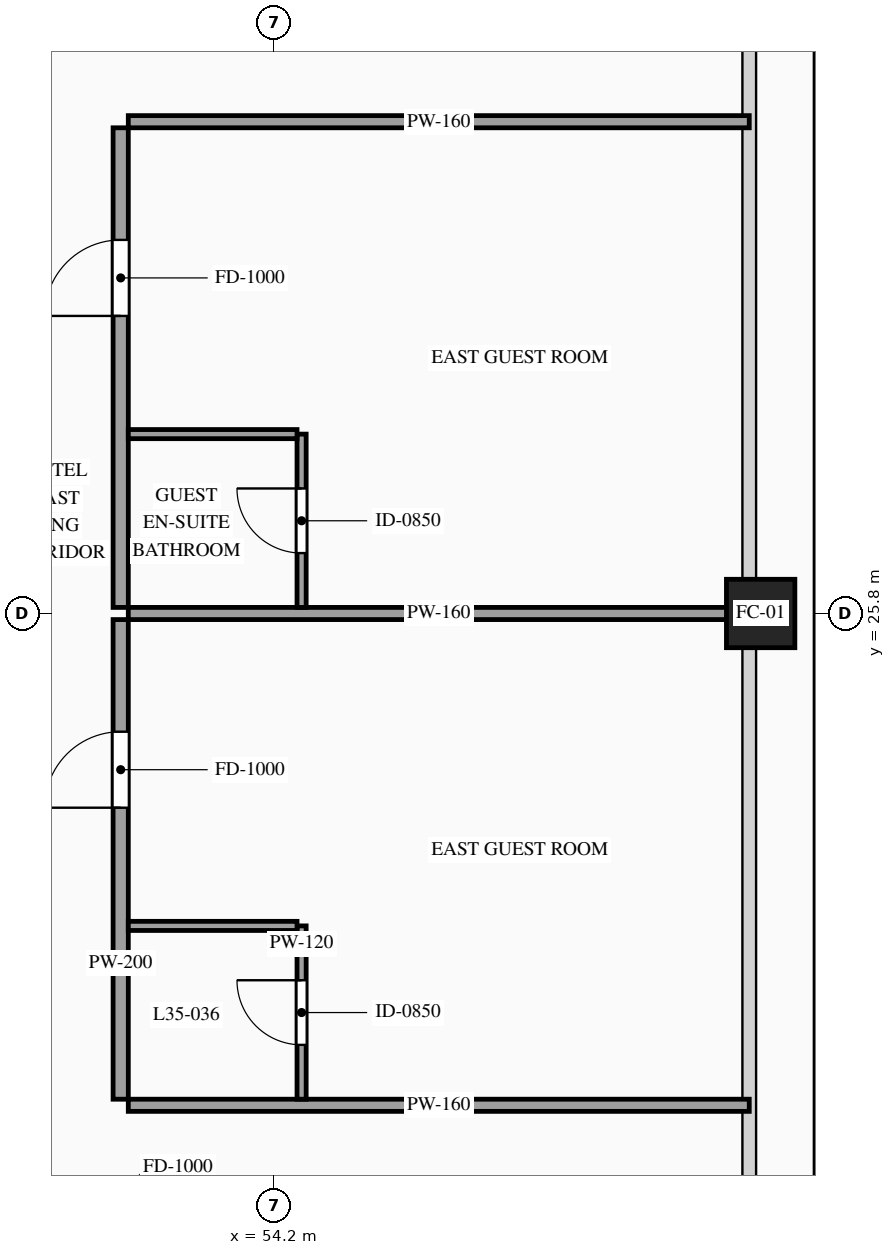
"""IFC4 building model, lengths in metres.
Left out: names, types, materials, properties, quantities, classifications, styles, units other than length and angle.
Written with IfcOpenShell. Run it as: python <this file> out.ifc"""

import sys

from ifc_helpers import new_model, si_unit, direction, frame, frame_2d, origin, origin_2d, place, context, subcontext, project, spatial, rectangle, hollow_rectangle, extrude, source, transform, mapped, element, fill, save


model = new_model("IFC4")
c1 = context("Model", 3, precision=1e-05, world=origin(), true_north=direction((0.0, 1.0)))
c2 = subcontext(c1, "Body", "Model", "MODEL_VIEW")
j1 = project(units=[si_unit("LENGTHUNIT", "METRE"), si_unit("PLANEANGLEUNIT", "RADIAN")], contexts=[c1])
p1 = place(None, origin())
s1 = spatial("IfcSite", under=j1, at=p1, CompositionType="ELEMENT")
p2 = place(p1, origin())
s2 = spatial("IfcBuilding", under=s1, at=p2, CompositionType="ELEMENT")
p3 = place(p2, frame((0.0, 0.0, 134.4)))
s3 = spatial("IfcBuildingStorey", under=s2, at=p3, CompositionType="ELEMENT", Elevation=134.4)
m1 = source(origin(), c2, "Body", "SweptSolid", [
    extrude(hollow_rectangle(XDim=0.9, YDim=0.9, WallThickness=0.042, at=origin_2d()), origin(), (0.0, 0.0, 1.0), 3.6),
])
p4 = place(p3, frame((60.6, 25.8, 0.0), z_axis=(0.0, 0.0, 1.0), x_axis=(1.0, 0.0, 0.0)))
e1 = element("IfcColumn", 1, at=p4, inside=s3, PredefinedType="COLUMN", context=c2, shape_type="MappedRepresentation", body=[
    mapped(m1, transform((0.0, 0.0, 0.0), scale=1.0)),
])
p5 = place(p3, frame((52.18, 19.41, 0.0), z_axis=(0.0, 0.0, 1.0), x_axis=(0.0, 1.0, 0.0)))
e2 = element("IfcWall", 2, at=p5, inside=s3, PredefinedType="PARTITIONING", context=c2, shape_type="SweptSolid", body=[
    extrude(rectangle(XDim=6.31, YDim=0.2, at=frame_2d((3.155, 0.0))), origin(), (0.0, 0.0, 1.0), 3.38),
])
p6 = place(p5, frame((3.835, 0.0, 0.0)))
e3 = element("IfcOpeningElement", 3, at=p6, cuts=e2, PredefinedType="OPENING", context=c2, shape_type="SweptSolid", body=[
    extrude(rectangle(XDim=1.0, YDim=2.2, at=frame_2d((0.5, 1.1))), frame((0.0, 0.115, 0.0), z_axis=(0.0, -1.0, 0.0), x_axis=(1.0, 0.0, 0.0)), (0.0, 0.0, 1.0), 0.23),
])
m2 = source(origin(), c2, "Body", "SweptSolid", [
    extrude(rectangle(XDim=8.17, YDim=0.16, at=frame_2d((4.085, 0.0))), origin(), (0.0, 0.0, 1.0), 2.675),
])
p7 = place(p3, frame((52.28, 25.8, 0.0), z_axis=(0.0, 0.0, 1.0), x_axis=(1.0, 0.0, 0.0)))
e4 = element("IfcWall", 4, at=p7, inside=s3, PredefinedType="PARTITIONING", context=c2, shape_type="MappedRepresentation", body=[
    mapped(m2, transform((0.0, 0.0, 0.0), scale=1.0)),
])
m3 = source(origin(), c2, "Body", "SweptSolid", [
    extrude(rectangle(XDim=8.17, YDim=0.16, at=frame_2d((4.085, 0.0))), origin(), (0.0, 0.0, 1.0), 2.875),
])
p8 = place(p3, frame((52.28, 19.33, 0.0), z_axis=(0.0, 0.0, 1.0), x_axis=(1.0, 0.0, 0.0)))
e5 = element("IfcWall", 5, at=p8, inside=s3, PredefinedType="PARTITIONING", context=c2, shape_type="MappedRepresentation", body=[
    mapped(m3, transform((0.0, 0.0, 0.0), scale=1.0)),
])
p9 = place(p3, frame((54.56, 19.41, 0.0), z_axis=(0.0, 0.0, 1.0), x_axis=(0.0, 1.0, 0.0)))
e6 = element("IfcWall", 6, at=p9, inside=s3, PredefinedType="PARTITIONING", context=c2, shape_type="SweptSolid", body=[
    extrude(rectangle(XDim=2.28, YDim=0.12, at=frame_2d((1.14, 0.0))), origin(), (0.0, 0.0, 1.0), 3.38),
])
p10 = place(p9, frame((0.715, 0.0, 0.0)))
e7 = element("IfcOpeningElement", 7, at=p10, cuts=e6, PredefinedType="OPENING", context=c2, shape_type="SweptSolid", body=[
    extrude(rectangle(XDim=0.85, YDim=2.1, at=frame_2d((0.425, 1.05))), frame((0.0, 0.075, 0.0), z_axis=(0.0, -1.0, 0.0), x_axis=(1.0, 0.0, 0.0)), (0.0, 0.0, 1.0), 0.15),
])
m4 = source(origin(), c2, "Body", "SweptSolid", [
    extrude(rectangle(XDim=2.22, YDim=0.12, at=frame_2d((1.11, 0.0))), origin(), (0.0, 0.0, 1.0), 3.38),
])
p11 = place(p3, frame((52.28, 21.69, 0.0), z_axis=(0.0, 0.0, 1.0), x_axis=(1.0, 0.0, 0.0)))
e8 = element("IfcWall", 8, at=p11, inside=s3, PredefinedType="PARTITIONING", context=c2, shape_type="MappedRepresentation", body=[
    mapped(m4, transform((0.0, 0.0, 0.0), scale=1.0)),
])
p12 = place(p3, frame((52.18, 25.88, 0.0), z_axis=(0.0, 0.0, 1.0), x_axis=(0.0, 1.0, 0.0)))
e9 = element("IfcWall", 9, at=p12, inside=s3, PredefinedType="PARTITIONING", context=c2, shape_type="SweptSolid", body=[
    extrude(rectangle(XDim=6.31, YDim=0.2, at=frame_2d((3.155, 0.0))), origin(), (0.0, 0.0, 1.0), 3.38),
])
p13 = place(p12, frame((3.835, 0.0, 0.0)))
e10 = element("IfcOpeningElement", 10, at=p13, cuts=e9, PredefinedType="OPENING", context=c2, shape_type="SweptSolid", body=[
    extrude(rectangle(XDim=1.0, YDim=2.2, at=frame_2d((0.5, 1.1))), frame((0.0, 0.115, 0.0), z_axis=(0.0, -1.0, 0.0), x_axis=(1.0, 0.0, 0.0)), (0.0, 0.0, 1.0), 0.23),
])
p14 = place(p3, frame((52.28, 32.27, 0.0), z_axis=(0.0, 0.0, 1.0), x_axis=(1.0, 0.0, 0.0)))
e11 = element("IfcWall", 11, at=p14, inside=s3, PredefinedType="PARTITIONING", context=c2, shape_type="MappedRepresentation", body=[
    mapped(m3, transform((0.0, 0.0, 0.0), scale=1.0)),
])
p15 = place(p3, frame((54.56, 25.88, 0.0), z_axis=(0.0, 0.0, 1.0), x_axis=(0.0, 1.0, 0.0)))
e12 = element("IfcWall", 12, at=p15, inside=s3, PredefinedType="PARTITIONING", context=c2, shape_type="SweptSolid", body=[
    extrude(rectangle(XDim=2.28, YDim=0.12, at=frame_2d((1.14, 0.0))), origin(), (0.0, 0.0, 1.0), 3.38),
])
p16 = place(p15, frame((0.715, 0.0, 0.0)))
e13 = element("IfcOpeningElement", 13, at=p16, cuts=e12, PredefinedType="OPENING", context=c2, shape_type="SweptSolid", body=[
    extrude(rectangle(XDim=0.85, YDim=2.1, at=frame_2d((0.425, 1.05))), frame((0.0, 0.075, 0.0), z_axis=(0.0, -1.0, 0.0), x_axis=(1.0, 0.0, 0.0)), (0.0, 0.0, 1.0), 0.15),
])
p17 = place(p3, frame((52.28, 28.16, 0.0), z_axis=(0.0, 0.0, 1.0), x_axis=(1.0, 0.0, 0.0)))
e14 = element("IfcWall", 14, at=p17, inside=s3, PredefinedType="PARTITIONING", context=c2, shape_type="MappedRepresentation", body=[
    mapped(m4, transform((0.0, 0.0, 0.0), scale=1.0)),
])
m5 = source(origin(), c2, "Body", "SweptSolid", [
    extrude(rectangle(XDim=1.0, YDim=2.2, at=frame_2d((0.5, 1.1))), frame((0.0, 0.025, 0.0), z_axis=(0.0, -1.0, 0.0), x_axis=(1.0, 0.0, 0.0)), (0.0, 0.0, 1.0), 0.05),
])
p18 = place(p6, origin())
e15 = element("IfcDoor", 15, at=p18, inside=s3, OperationType="SINGLE_SWING_LEFT", PredefinedType="DOOR", context=c2, shape_type="MappedRepresentation", body=[
    mapped(m5, transform((0.0, 0.0, 0.0), scale=1.0)),
])
fill(e3, e15)
m6 = source(origin(), c2, "Body", "SweptSolid", [
    extrude(rectangle(XDim=0.85, YDim=2.1, at=frame_2d((0.425, 1.05))), frame((0.0, 0.025, 0.0), z_axis=(0.0, -1.0, 0.0), x_axis=(1.0, 0.0, 0.0)), (0.0, 0.0, 1.0), 0.05),
])
p19 = place(p10, origin())
e16 = element("IfcDoor", 16, at=p19, inside=s3, OperationType="SINGLE_SWING_RIGHT", PredefinedType="DOOR", context=c2, shape_type="MappedRepresentation", body=[
    mapped(m6, transform((0.0, 0.0, 0.0), scale=1.0)),
])
fill(e7, e16)
p20 = place(p13, origin())
e17 = element("IfcDoor", 17, at=p20, inside=s3, OperationType="SINGLE_SWING_LEFT", PredefinedType="DOOR", context=c2, shape_type="MappedRepresentation", body=[
    mapped(m5, transform((0.0, 0.0, 0.0), scale=1.0)),
])
fill(e10, e17)
p21 = place(p16, origin())
e18 = element("IfcDoor", 18, at=p21, inside=s3, OperationType="SINGLE_SWING_RIGHT", PredefinedType="DOOR", context=c2, shape_type="MappedRepresentation", body=[
    mapped(m6, transform((0.0, 0.0, 0.0), scale=1.0)),
])
fill(e13, e18)
save(model, sys.argv[1])
